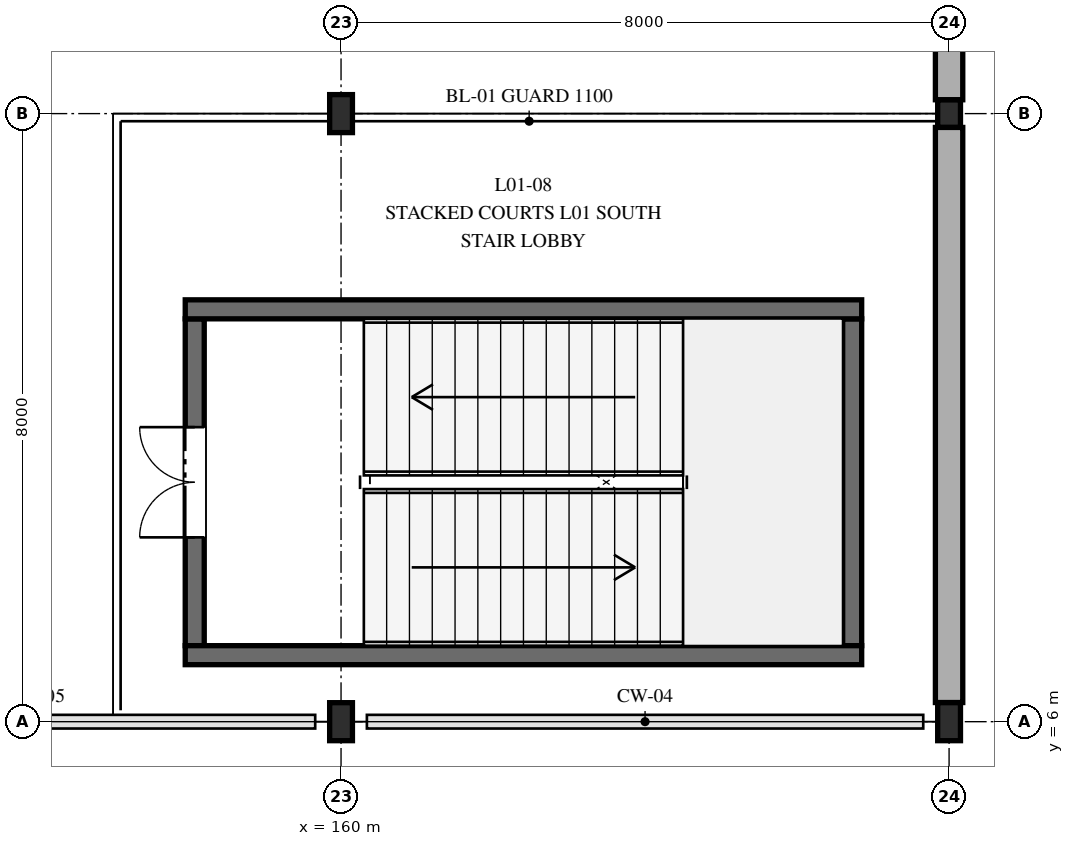
"""IFC4 building model, lengths in metres.
Left out: names, types, materials, properties, quantities, classifications, styles, units other than length and angle.
Written with IfcOpenShell. Run it as: python <this file> out.ifc"""

import sys

from ifc_helpers import new_model, si_unit, direction, frame, frame_2d, origin, origin_2d, place, context, subcontext, project, spatial, rectangle, i_section, extrude, element, fill, save


model = new_model("IFC4")
c1 = context("Model", 3, precision=1e-05, world=origin(), true_north=direction((0.0, 1.0)))
c2 = subcontext(c1, "Body", "Model", "MODEL_VIEW")
j1 = project(units=[si_unit("LENGTHUNIT", "METRE"), si_unit("PLANEANGLEUNIT", "RADIAN")], contexts=[c1])
p1 = place(None, origin())
s1 = spatial("IfcSite", under=j1, at=p1, CompositionType="ELEMENT")
p2 = place(p1, origin())
s2 = spatial("IfcBuilding", under=s1, at=p2, CompositionType="ELEMENT")
p3 = place(p2, frame((0.0, 0.0, 4.8)))
s3 = spatial("IfcBuildingStorey", under=s2, at=p3, CompositionType="ELEMENT", Elevation=4.8)
for number, where, z_axis, x_axis in (
    (1, (160.0, 6.0, 0.0), (0.0, 0.0, 1.0), (1.0, 0.0, 0.0)),
    (2, (168.0, 6.0, 0.0), (0.0, 0.0, 1.0), (1.0, 0.0, 0.0)),
    (3, (160.0, 14.0, 0.0), (0.0, 0.0, 1.0), (1.0, 0.0, 0.0)),
):
    element("IfcColumn", number, at=place(p3, frame(where, z_axis=z_axis, x_axis=x_axis)), inside=s3, PredefinedType="COLUMN", context=c2, shape_type="SweptSolid", body=[
        extrude(i_section(OverallWidth=0.3, OverallDepth=0.5, WebThickness=0.014, FlangeThickness=0.028, FilletRadius=0.027, at=origin_2d()), origin(), (0.0, 0.0, 1.0), 4.31),
    ])
p4 = place(p3, frame((168.0, 14.0, 0.0), z_axis=(0.0, 0.0, 1.0), x_axis=(1.0, 0.0, 0.0)))
e4 = element("IfcColumn", 4, at=p4, inside=s3, PredefinedType="COLUMN", context=c2, shape_type="SweptSolid", body=[
    extrude(i_section(OverallWidth=0.3, OverallDepth=0.36, WebThickness=0.012, FlangeThickness=0.022, FilletRadius=0.027, at=origin_2d()), origin(), (0.0, 0.0, 1.0), 4.8),
])
p5 = place(p3, frame((168.0, 6.252, 0.0), z_axis=(0.0, 0.0, 1.0), x_axis=(0.0, 1.0, 0.0)))
e5 = element("IfcWall", 5, at=p5, inside=s3, PredefinedType="STANDARD", context=c2, shape_type="SweptSolid", body=[
    extrude(rectangle(XDim=7.566, YDim=0.36, at=frame_2d((3.783, 0.0))), origin(), (0.0, 0.0, 1.0), 4.8),
])
p6 = place(p3, frame((168.0, 14.182, 0.0), z_axis=(0.0, 0.0, 1.0), x_axis=(0.0, 1.0, 0.0)))
e6 = element("IfcWall", 6, at=p6, inside=s3, PredefinedType="STANDARD", context=c2, shape_type="SweptSolid", body=[
    extrude(rectangle(XDim=7.636, YDim=0.36, at=frame_2d((3.818, 0.0))), origin(), (0.0, 0.0, 1.0), 4.8),
])
p7 = place(p3, frame((158.075, 7.0, 0.0), z_axis=(0.0, 0.0, 1.0), x_axis=(0.0, 1.0, 0.0)))
e7 = element("IfcWall", 7, at=p7, inside=s3, PredefinedType="SHEAR", context=c2, shape_type="SweptSolid", body=[
    extrude(rectangle(XDim=4.3, YDim=0.25, at=frame_2d((2.15, 0.0))), origin(), (0.0, 0.0, 1.0), 4.8),
])
p8 = place(p7, frame((1.425, 0.0, 0.0)))
e8 = element("IfcOpeningElement", 8, at=p8, cuts=e7, PredefinedType="OPENING", context=c2, shape_type="SweptSolid", body=[
    extrude(rectangle(XDim=1.45, YDim=2.2, at=frame_2d((0.725, 1.1))), frame((0.0, 0.135, 0.0), z_axis=(0.0, -1.0, 0.0), x_axis=(1.0, 0.0, 0.0)), (0.0, 0.0, 1.0), 0.27),
])
p9 = place(p3, frame((166.725, 11.3, 0.0), z_axis=(0.0, 0.0, 1.0), x_axis=(0.0, -1.0, 0.0)))
e9 = element("IfcWall", 9, at=p9, inside=s3, PredefinedType="SHEAR", context=c2, shape_type="SweptSolid", body=[
    extrude(rectangle(XDim=4.3, YDim=0.25, at=frame_2d((2.15, 0.0))), origin(), (0.0, 0.0, 1.0), 4.8),
])
for number, where, z_axis, x_axis in (
    (10, (157.95, 6.875, 0.0), (0.0, 0.0, 1.0), (1.0, 0.0, 0.0)),
    (11, (166.85, 11.425, 0.0), (0.0, 0.0, 1.0), (-1.0, 0.0, 0.0)),
):
    element("IfcWall", number, at=place(p3, frame(where, z_axis=z_axis, x_axis=x_axis)), inside=s3, PredefinedType="SHEAR", context=c2, shape_type="SweptSolid", body=[
        extrude(rectangle(XDim=8.9, YDim=0.25, at=frame_2d((4.45, 0.0))), origin(), (0.0, 0.0, 1.0), 4.8),
    ])
p10 = place(p8, origin())
e12 = element("IfcDoor", 12, at=p10, inside=s3, OperationType="DOUBLE_DOOR_SINGLE_SWING", PredefinedType="DOOR", context=c2, shape_type="SweptSolid", body=[
    extrude(rectangle(XDim=1.45, YDim=2.2, at=frame_2d((0.725, 1.1))), frame((0.0, 0.025, 0.0), z_axis=(0.0, -1.0, 0.0), x_axis=(1.0, 0.0, 0.0)), (0.0, 0.0, 1.0), 0.05),
])
fill(e8, e12)
save(model, sys.argv[1])
